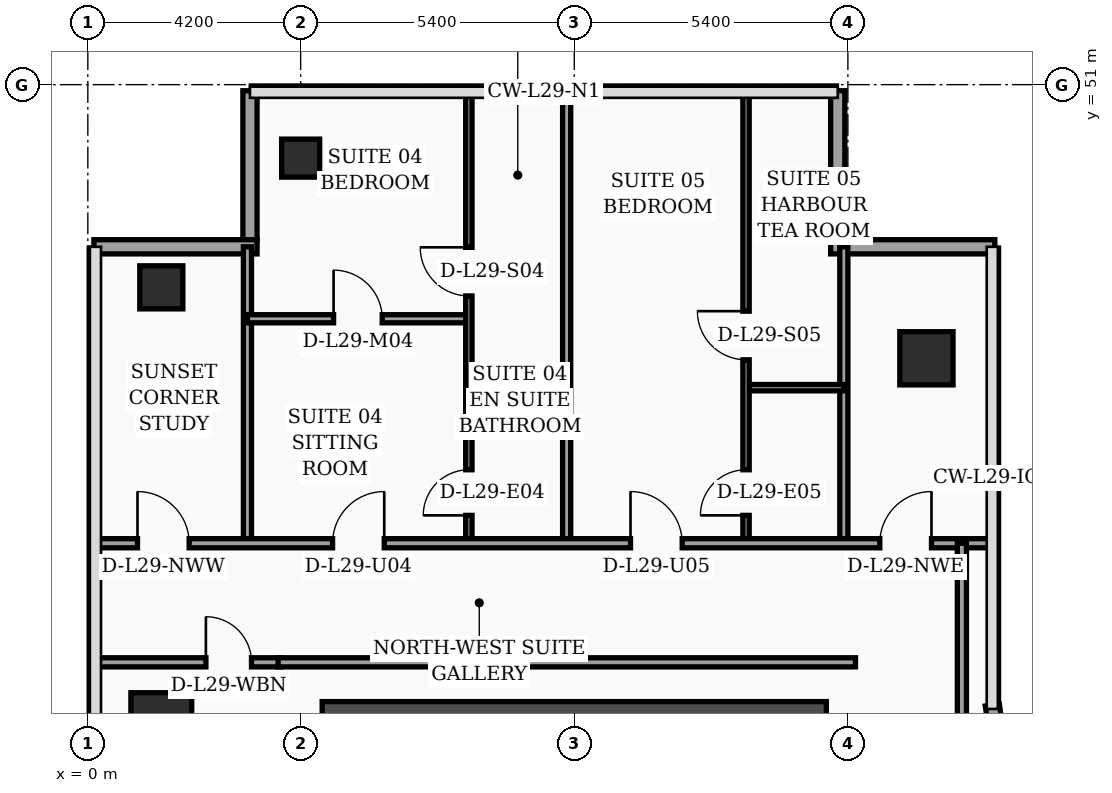
"""IFC4 building model, lengths in metres.
Left out: names, types, materials, properties, quantities, classifications, styles, units other than length and angle.
Written with IfcOpenShell. Run it as: python <this file> out.ifc"""

import sys

from ifc_helpers import new_model, si_unit, direction, frame, frame_2d, origin, origin_2d, place, context, subcontext, project, spatial, rectangle, hollow_rectangle, extrude, element, fill, save


model = new_model("IFC4")
c1 = context("Model", 3, precision=1e-05, world=origin(), true_north=direction((0.0, 1.0)))
c2 = subcontext(c1, "Body", "Model", "MODEL_VIEW")
j1 = project(units=[si_unit("LENGTHUNIT", "METRE"), si_unit("PLANEANGLEUNIT", "RADIAN")], contexts=[c1])
p1 = place(None, origin())
s1 = spatial("IfcSite", under=j1, at=p1, CompositionType="ELEMENT")
p2 = place(p1, origin())
s2 = spatial("IfcBuilding", under=s1, at=p2, CompositionType="ELEMENT")
p3 = place(p2, frame((0.0, 0.0, 120.2)))
s3 = spatial("IfcBuildingStorey", under=s2, at=p3, CompositionType="ELEMENT", Elevation=120.2)
p4 = place(p3, frame((4.625, 38.4, 0.0), z_axis=(0.0, 0.0, 1.0), x_axis=(1.0, 0.0, 0.0)))
e1 = element("IfcWall", 1, at=p4, inside=s3, PredefinedType="SHEAR", context=c2, shape_type="SweptSolid", body=[
    extrude(rectangle(XDim=9.95, YDim=0.85, at=frame_2d((4.975, 0.0))), origin(), (0.0, 0.0, 1.0), 3.56),
])
p5 = place(p3, frame((1.45, 38.4, 0.0), z_axis=(0.0, 0.0, 1.0), x_axis=(1.0, 0.0, 0.0)))
e2 = element("IfcColumn", 2, at=p5, inside=s3, PredefinedType="COLUMN", context=c2, shape_type="SweptSolid", body=[
    extrude(rectangle(XDim=1.2, YDim=1.2, at=origin_2d()), origin(), (0.0, 0.0, 1.0), 3.56),
])
p6 = place(p3, frame((1.45, 47.0, 0.0), z_axis=(0.0, 0.0, 1.0), x_axis=(1.0, 0.0, 0.0)))
e3 = element("IfcColumn", 3, at=p6, inside=s3, PredefinedType="COLUMN", context=c2, shape_type="SweptSolid", body=[
    extrude(hollow_rectangle(XDim=0.85, YDim=0.85, WallThickness=0.036, at=origin_2d()), origin(), (0.0, 0.0, 1.0), 3.56),
])
p7 = place(p3, frame((4.2, 49.55, 0.0), z_axis=(0.0, 0.0, 1.0), x_axis=(1.0, 0.0, 0.0)))
e4 = element("IfcColumn", 4, at=p7, inside=s3, PredefinedType="COLUMN", context=c2, shape_type="SweptSolid", body=[
    extrude(hollow_rectangle(XDim=0.75, YDim=0.75, WallThickness=0.032, at=origin_2d()), origin(), (0.0, 0.0, 1.0), 3.56),
])
p8 = place(p3, frame((16.55, 45.6, 0.0), z_axis=(0.0, 0.0, 1.0), x_axis=(1.0, 0.0, 0.0)))
e5 = element("IfcColumn", 5, at=p8, inside=s3, PredefinedType="COLUMN", context=c2, shape_type="SweptSolid", body=[
    extrude(rectangle(XDim=1.05, YDim=1.05, at=origin_2d()), origin(), (0.0, 0.0, 1.0), 3.56),
])
p9 = place(p3, frame((17.962, 38.03, 0.0), z_axis=(0.0, 0.0, 1.0), x_axis=(-0.15141125477, 0.988470855377, 0.0)))
e6 = element("IfcWall", 6, at=p9, inside=s3, PredefinedType="SOLIDWALL", context=c2, shape_type="SweptSolid", body=[
    extrude(rectangle(XDim=0.739, YDim=0.28, at=frame_2d((0.369, 0.0))), origin(), (0.0, 0.0, 1.0), 3.56),
])
p10 = place(p3, frame((17.9, 47.8, 0.0), z_axis=(0.0, 0.0, 1.0), x_axis=(-1.0, 0.0, 0.0)))
e7 = element("IfcWall", 7, at=p10, inside=s3, PredefinedType="SOLIDWALL", context=c2, shape_type="SweptSolid", body=[
    extrude(rectangle(XDim=3.24, YDim=0.28, at=frame_2d((1.62, 0.0))), origin(), (0.0, 0.0, 1.0), 3.56),
])
p11 = place(p3, frame((14.8, 47.94, 0.0), z_axis=(0.0, 0.0, 1.0), x_axis=(0.0, 1.0, 0.0)))
e8 = element("IfcWall", 8, at=p11, inside=s3, PredefinedType="SOLIDWALL", context=c2, shape_type="SweptSolid", body=[
    extrude(rectangle(XDim=2.94, YDim=0.28, at=frame_2d((1.47, 0.0))), origin(), (0.0, 0.0, 1.0), 3.56),
])
p12 = place(p3, frame((3.2, 50.88, 0.0), z_axis=(0.0, 0.0, 1.0), x_axis=(0.0, -1.0, 0.0)))
e9 = element("IfcWall", 9, at=p12, inside=s3, PredefinedType="SOLIDWALL", context=c2, shape_type="SweptSolid", body=[
    extrude(rectangle(XDim=2.94, YDim=0.28, at=frame_2d((1.47, 0.0))), origin(), (0.0, 0.0, 1.0), 3.04),
])
p13 = place(p3, frame((3.34, 47.8, 0.0), z_axis=(0.0, 0.0, 1.0), x_axis=(-1.0, 0.0, 0.0)))
e10 = element("IfcWall", 10, at=p13, inside=s3, PredefinedType="SOLIDWALL", context=c2, shape_type="SweptSolid", body=[
    extrude(rectangle(XDim=3.22, YDim=0.28, at=frame_2d((1.61, 0.0))), origin(), (0.0, 0.0, 1.0), 3.04),
])
p14 = place(p3, frame((0.08, 39.6, 0.0), z_axis=(0.0, 0.0, 1.0), x_axis=(1.0, 0.0, 0.0)))
e11 = element("IfcWall", 11, at=p14, inside=s3, PredefinedType="PARTITIONING", context=c2, shape_type="SweptSolid", body=[
    extrude(rectangle(XDim=3.725, YDim=0.18, at=frame_2d((1.862, 0.0))), origin(), (0.0, 0.0, 1.0), 2.84),
])
p15 = place(p14, frame((2.25, 0.0, 0.0)))
e12 = element("IfcOpeningElement", 12, at=p15, cuts=e11, PredefinedType="OPENING", context=c2, shape_type="SweptSolid", body=[
    extrude(rectangle(XDim=0.9, YDim=2.15, at=frame_2d((0.45, 1.075))), frame((0.0, 0.1, 0.0), z_axis=(0.0, -1.0, 0.0), x_axis=(1.0, 0.0, 0.0)), (0.0, 0.0, 1.0), 0.2),
])
p16 = place(p3, frame((3.15, 41.95, 0.0), z_axis=(0.0, 0.0, 1.0), x_axis=(0.0, 1.0, 0.0)))
e13 = element("IfcWall", 13, at=p16, inside=s3, PredefinedType="PARTITIONING", context=c2, shape_type="SweptSolid", body=[
    extrude(rectangle(XDim=5.85, YDim=0.16, at=frame_2d((2.925, 0.0))), origin(), (0.0, 0.0, 1.0), 3.14),
])
p17 = place(p3, frame((14.92, 41.95, 0.0), z_axis=(0.0, 0.0, 1.0), x_axis=(0.0, 1.0, 0.0)))
e14 = element("IfcWall", 14, at=p17, inside=s3, PredefinedType="PARTITIONING", context=c2, shape_type="SweptSolid", body=[
    extrude(rectangle(XDim=5.85, YDim=0.16, at=frame_2d((2.925, 0.0))), origin(), (0.0, 0.0, 1.0), 3.04),
])
p18 = place(p3, frame((7.52, 45.02, 0.0), z_axis=(0.0, 0.0, 1.0), x_axis=(1.0, 0.0, 0.0)))
e15 = element("IfcWall", 15, at=p18, inside=s3, PredefinedType="PARTITIONING", context=c2, shape_type="SweptSolid", body=[
    extrude(rectangle(XDim=1.93, YDim=0.125, at=frame_2d((0.965, 0.0))), origin(), (0.0, 0.0, 1.0), 3.56),
])
p19 = place(p3, frame((3.15, 46.38, 0.0), z_axis=(0.0, 0.0, 1.0), x_axis=(1.0, 0.0, 0.0)))
e16 = element("IfcWall", 16, at=p19, inside=s3, PredefinedType="PARTITIONING", context=c2, shape_type="SweptSolid", body=[
    extrude(rectangle(XDim=4.37, YDim=0.16, at=frame_2d((2.185, 0.0))), origin(), (0.0, 0.0, 1.0), 2.84),
])
p20 = place(p19, frame((1.7, 0.0, 0.0)))
e17 = element("IfcOpeningElement", 17, at=p20, cuts=e16, PredefinedType="OPENING", context=c2, shape_type="SweptSolid", body=[
    extrude(rectangle(XDim=0.96, YDim=2.2, at=frame_2d((0.48, 1.1))), frame((0.0, 0.09, 0.0), z_axis=(0.0, -1.0, 0.0), x_axis=(1.0, 0.0, 0.0)), (0.0, 0.0, 1.0), 0.18),
])
p21 = place(p3, frame((7.52, 41.95, 0.0), z_axis=(0.0, 0.0, 1.0), x_axis=(0.0, 1.0, 0.0)))
e18 = element("IfcWall", 18, at=p21, inside=s3, PredefinedType="PARTITIONING", context=c2, shape_type="SweptSolid", body=[
    extrude(rectangle(XDim=8.99, YDim=0.125, at=frame_2d((4.495, 0.0))), origin(), (0.0, 0.0, 1.0), 3.04),
])
p22 = place(p21, frame((0.55, 0.0, 0.0)))
e19 = element("IfcOpeningElement", 19, at=p22, cuts=e18, PredefinedType="OPENING", context=c2, shape_type="SweptSolid", body=[
    extrude(rectangle(XDim=0.9, YDim=2.15, at=frame_2d((0.45, 1.075))), frame((0.0, 0.073, 0.0), z_axis=(0.0, -1.0, 0.0), x_axis=(1.0, 0.0, 0.0)), (0.0, 0.0, 1.0), 0.145),
])
p23 = place(p21, frame((4.88, 0.0, 0.0)))
e20 = element("IfcOpeningElement", 20, at=p23, cuts=e18, PredefinedType="OPENING", context=c2, shape_type="SweptSolid", body=[
    extrude(rectangle(XDim=0.96, YDim=2.2, at=frame_2d((0.48, 1.1))), frame((0.0, 0.073, 0.0), z_axis=(0.0, -1.0, 0.0), x_axis=(1.0, 0.0, 0.0)), (0.0, 0.0, 1.0), 0.145),
])
p24 = place(p3, frame((12.99, 45.02, 0.0), z_axis=(0.0, 0.0, 1.0), x_axis=(1.0, 0.0, 0.0)))
e21 = element("IfcWall", 21, at=p24, inside=s3, PredefinedType="PARTITIONING", context=c2, shape_type="SweptSolid", body=[
    extrude(rectangle(XDim=1.93, YDim=0.125, at=frame_2d((0.965, 0.0))), origin(), (0.0, 0.0, 1.0), 3.56),
])
p25 = place(p3, frame((12.99, 41.95, 0.0), z_axis=(0.0, 0.0, 1.0), x_axis=(0.0, 1.0, 0.0)))
e22 = element("IfcWall", 22, at=p25, inside=s3, PredefinedType="PARTITIONING", context=c2, shape_type="SweptSolid", body=[
    extrude(rectangle(XDim=8.99, YDim=0.125, at=frame_2d((4.495, 0.0))), origin(), (0.0, 0.0, 1.0), 3.04),
])
p26 = place(p25, frame((0.55, 0.0, 0.0)))
e23 = element("IfcOpeningElement", 23, at=p26, cuts=e22, PredefinedType="OPENING", context=c2, shape_type="SweptSolid", body=[
    extrude(rectangle(XDim=0.9, YDim=2.15, at=frame_2d((0.45, 1.075))), frame((0.0, 0.073, 0.0), z_axis=(0.0, -1.0, 0.0), x_axis=(1.0, 0.0, 0.0)), (0.0, 0.0, 1.0), 0.145),
])
p27 = place(p25, frame((3.62, 0.0, 0.0)))
e24 = element("IfcOpeningElement", 24, at=p27, cuts=e22, PredefinedType="OPENING", context=c2, shape_type="SweptSolid", body=[
    extrude(rectangle(XDim=0.96, YDim=2.2, at=frame_2d((0.48, 1.1))), frame((0.0, 0.073, 0.0), z_axis=(0.0, -1.0, 0.0), x_axis=(1.0, 0.0, 0.0)), (0.0, 0.0, 1.0), 0.145),
])
p28 = place(p3, frame((9.45, 41.95, 0.0), z_axis=(0.0, 0.0, 1.0), x_axis=(0.0, 1.0, 0.0)))
e25 = element("IfcWall", 25, at=p28, inside=s3, PredefinedType="PARTITIONING", context=c2, shape_type="SweptSolid", body=[
    extrude(rectangle(XDim=8.99, YDim=0.16, at=frame_2d((4.495, 0.0))), origin(), (0.0, 0.0, 1.0), 3.04),
])
p29 = place(p3, frame((0.08, 41.95, 0.0), z_axis=(0.0, 0.0, 1.0), x_axis=(1.0, 0.0, 0.0)))
e26 = element("IfcWall", 26, at=p29, inside=s3, PredefinedType="PARTITIONING", context=c2, shape_type="SweptSolid", body=[
    extrude(rectangle(XDim=17.77, YDim=0.18, at=frame_2d((8.885, 0.0))), origin(), (0.0, 0.0, 1.0), 2.84),
])
p30 = place(p29, frame((0.9, 0.0, 0.0)))
e27 = element("IfcOpeningElement", 27, at=p30, cuts=e26, PredefinedType="OPENING", context=c2, shape_type="SweptSolid", body=[
    extrude(rectangle(XDim=1.02, YDim=2.2, at=frame_2d((0.51, 1.1))), frame((0.0, 0.1, 0.0), z_axis=(0.0, -1.0, 0.0), x_axis=(1.0, 0.0, 0.0)), (0.0, 0.0, 1.0), 0.2),
])
p31 = place(p29, frame((4.75, 0.0, 0.0)))
e28 = element("IfcOpeningElement", 28, at=p31, cuts=e26, PredefinedType="OPENING", context=c2, shape_type="SweptSolid", body=[
    extrude(rectangle(XDim=1.02, YDim=2.2, at=frame_2d((0.51, 1.1))), frame((0.0, 0.1, 0.0), z_axis=(0.0, -1.0, 0.0), x_axis=(1.0, 0.0, 0.0)), (0.0, 0.0, 1.0), 0.2),
])
p32 = place(p29, frame((10.63, 0.0, 0.0)))
e29 = element("IfcOpeningElement", 29, at=p32, cuts=e26, PredefinedType="OPENING", context=c2, shape_type="SweptSolid", body=[
    extrude(rectangle(XDim=1.02, YDim=2.2, at=frame_2d((0.51, 1.1))), frame((0.0, 0.1, 0.0), z_axis=(0.0, -1.0, 0.0), x_axis=(1.0, 0.0, 0.0)), (0.0, 0.0, 1.0), 0.2),
])
p33 = place(p29, frame((15.55, 0.0, 0.0)))
e30 = element("IfcOpeningElement", 30, at=p33, cuts=e26, PredefinedType="OPENING", context=c2, shape_type="SweptSolid", body=[
    extrude(rectangle(XDim=1.02, YDim=2.2, at=frame_2d((0.51, 1.1))), frame((0.0, 0.1, 0.0), z_axis=(0.0, -1.0, 0.0), x_axis=(1.0, 0.0, 0.0)), (0.0, 0.0, 1.0), 0.2),
])
p34 = place(p3, frame((17.25, 24.3, 0.0), z_axis=(0.0, 0.0, 1.0), x_axis=(0.0, 1.0, 0.0)))
e31 = element("IfcWall", 31, at=p34, inside=s3, PredefinedType="PARTITIONING", context=c2, shape_type="SweptSolid", body=[
    extrude(rectangle(XDim=17.65, YDim=0.18, at=frame_2d((8.825, 0.0))), origin(), (0.0, 0.0, 1.0), 2.84),
])
p35 = place(p3, frame((3.755, 39.6, 0.0), z_axis=(0.0, 0.0, 1.0), x_axis=(1.0, 0.0, 0.0)))
e32 = element("IfcWall", 32, at=p35, inside=s3, PredefinedType="PARTITIONING", context=c2, shape_type="SweptSolid", body=[
    extrude(rectangle(XDim=11.395, YDim=0.18, at=frame_2d((5.698, 0.0))), origin(), (0.0, 0.0, 1.0), 2.84),
])
p36 = place(p15, origin())
e33 = element("IfcDoor", 33, at=p36, inside=s3, OperationType="SINGLE_SWING_LEFT", PredefinedType="DOOR", context=c2, shape_type="SweptSolid", body=[
    extrude(rectangle(XDim=0.9, YDim=2.15, at=frame_2d((0.45, 1.075))), frame((0.0, 0.025, 0.0), z_axis=(0.0, -1.0, 0.0), x_axis=(1.0, 0.0, 0.0)), (0.0, 0.0, 1.0), 0.05),
])
fill(e12, e33)
p37 = place(p20, origin())
e34 = element("IfcDoor", 34, at=p37, inside=s3, OperationType="SINGLE_SWING_LEFT", PredefinedType="DOOR", context=c2, shape_type="SweptSolid", body=[
    extrude(rectangle(XDim=0.96, YDim=2.2, at=frame_2d((0.48, 1.1))), frame((0.0, 0.025, 0.0), z_axis=(0.0, -1.0, 0.0), x_axis=(1.0, 0.0, 0.0)), (0.0, 0.0, 1.0), 0.05),
])
fill(e17, e34)
p38 = place(p22, origin())
e35 = element("IfcDoor", 35, at=p38, inside=s3, OperationType="SINGLE_SWING_LEFT", PredefinedType="DOOR", context=c2, shape_type="SweptSolid", body=[
    extrude(rectangle(XDim=0.9, YDim=2.15, at=frame_2d((0.45, 1.075))), frame((0.0, 0.025, 0.0), z_axis=(0.0, -1.0, 0.0), x_axis=(1.0, 0.0, 0.0)), (0.0, 0.0, 1.0), 0.05),
])
fill(e19, e35)
p39 = place(p23, origin())
e36 = element("IfcDoor", 36, at=p39, inside=s3, OperationType="SINGLE_SWING_RIGHT", PredefinedType="DOOR", context=c2, shape_type="SweptSolid", body=[
    extrude(rectangle(XDim=0.96, YDim=2.2, at=frame_2d((0.48, 1.1))), frame((0.0, 0.025, 0.0), z_axis=(0.0, -1.0, 0.0), x_axis=(1.0, 0.0, 0.0)), (0.0, 0.0, 1.0), 0.05),
])
fill(e20, e36)
p40 = place(p26, origin())
e37 = element("IfcDoor", 37, at=p40, inside=s3, OperationType="SINGLE_SWING_LEFT", PredefinedType="DOOR", context=c2, shape_type="SweptSolid", body=[
    extrude(rectangle(XDim=0.9, YDim=2.15, at=frame_2d((0.45, 1.075))), frame((0.0, 0.025, 0.0), z_axis=(0.0, -1.0, 0.0), x_axis=(1.0, 0.0, 0.0)), (0.0, 0.0, 1.0), 0.05),
])
fill(e23, e37)
p41 = place(p27, origin())
e38 = element("IfcDoor", 38, at=p41, inside=s3, OperationType="SINGLE_SWING_RIGHT", PredefinedType="DOOR", context=c2, shape_type="SweptSolid", body=[
    extrude(rectangle(XDim=0.96, YDim=2.2, at=frame_2d((0.48, 1.1))), frame((0.0, 0.025, 0.0), z_axis=(0.0, -1.0, 0.0), x_axis=(1.0, 0.0, 0.0)), (0.0, 0.0, 1.0), 0.05),
])
fill(e24, e38)
p42 = place(p30, origin())
e39 = element("IfcDoor", 39, at=p42, inside=s3, OperationType="SINGLE_SWING_LEFT", PredefinedType="DOOR", context=c2, shape_type="SweptSolid", body=[
    extrude(rectangle(XDim=1.02, YDim=2.2, at=frame_2d((0.51, 1.1))), frame((0.0, 0.025, 0.0), z_axis=(0.0, -1.0, 0.0), x_axis=(1.0, 0.0, 0.0)), (0.0, 0.0, 1.0), 0.05),
])
fill(e27, e39)
p43 = place(p31, origin())
e40 = element("IfcDoor", 40, at=p43, inside=s3, OperationType="SINGLE_SWING_RIGHT", PredefinedType="DOOR", context=c2, shape_type="SweptSolid", body=[
    extrude(rectangle(XDim=1.02, YDim=2.2, at=frame_2d((0.51, 1.1))), frame((0.0, 0.025, 0.0), z_axis=(0.0, -1.0, 0.0), x_axis=(1.0, 0.0, 0.0)), (0.0, 0.0, 1.0), 0.05),
])
fill(e28, e40)
p44 = place(p32, origin())
e41 = element("IfcDoor", 41, at=p44, inside=s3, OperationType="SINGLE_SWING_LEFT", PredefinedType="DOOR", context=c2, shape_type="SweptSolid", body=[
    extrude(rectangle(XDim=1.02, YDim=2.2, at=frame_2d((0.51, 1.1))), frame((0.0, 0.025, 0.0), z_axis=(0.0, -1.0, 0.0), x_axis=(1.0, 0.0, 0.0)), (0.0, 0.0, 1.0), 0.05),
])
fill(e29, e41)
p45 = place(p33, origin())
e42 = element("IfcDoor", 42, at=p45, inside=s3, OperationType="SINGLE_SWING_RIGHT", PredefinedType="DOOR", context=c2, shape_type="SweptSolid", body=[
    extrude(rectangle(XDim=1.02, YDim=2.2, at=frame_2d((0.51, 1.1))), frame((0.0, 0.025, 0.0), z_axis=(0.0, -1.0, 0.0), x_axis=(1.0, 0.0, 0.0)), (0.0, 0.0, 1.0), 0.05),
])
fill(e30, e42)
save(model, sys.argv[1])
